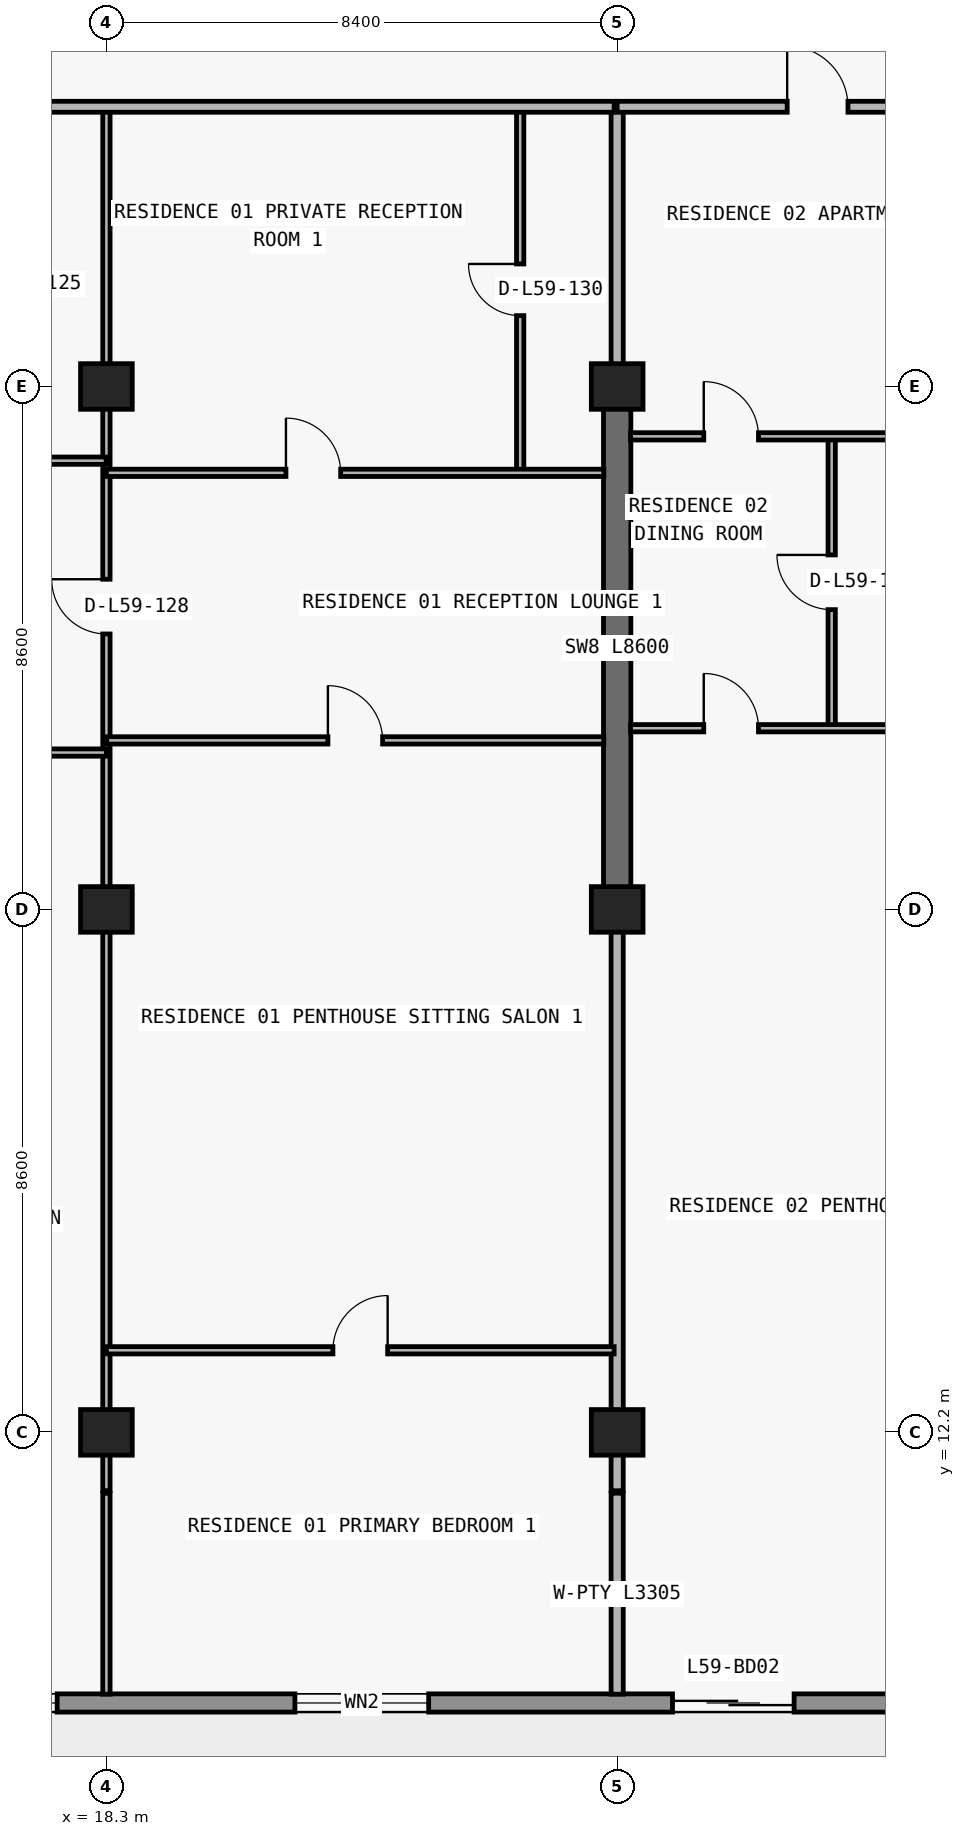
"""IFC4 building model, lengths in metres.
Left out: names, types, materials, properties, quantities, classifications, styles, units other than length and angle.
Written with IfcOpenShell. Run it as: python <this file> out.ifc"""

import sys

from ifc_helpers import new_model, si_unit, direction, frame, frame_2d, origin, origin_2d, place, context, subcontext, project, spatial, rectangle, extrude, element, fill, save


model = new_model("IFC4")
c1 = context("Model", 3, precision=1e-05, world=origin(), true_north=direction((0.0, 1.0)))
c2 = subcontext(c1, "Body", "Model", "MODEL_VIEW")
j1 = project(units=[si_unit("LENGTHUNIT", "METRE"), si_unit("PLANEANGLEUNIT", "RADIAN")], contexts=[c1])
p1 = place(None, origin())
s1 = spatial("IfcSite", under=j1, at=p1, CompositionType="ELEMENT")
p2 = place(p1, origin())
s2 = spatial("IfcBuilding", under=s1, at=p2, CompositionType="ELEMENT")
p3 = place(p2, frame((0.0, 0.0, 211.5)))
s3 = spatial("IfcBuildingStorey", under=s2, at=p3, CompositionType="ELEMENT", Elevation=211.5)
for number, where, z_axis, x_axis in (
    (1, (18.3, 12.2, 0.0), (0.0, 0.0, 1.0), (1.0, 0.0, 0.0)),
    (2, (26.7, 12.2, 0.0), (0.0, 0.0, 1.0), (1.0, 0.0, 0.0)),
    (3, (18.3, 20.8, 0.0), (0.0, 0.0, 1.0), (1.0, 0.0, 0.0)),
    (4, (26.7, 20.8, 0.0), (0.0, 0.0, 1.0), (1.0, 0.0, 0.0)),
    (5, (18.3, 29.4, 0.0), (0.0, 0.0, 1.0), (1.0, 0.0, 0.0)),
    (6, (26.7, 29.4, 0.0), (0.0, 0.0, 1.0), (1.0, 0.0, 0.0)),
):
    element("IfcColumn", number, at=place(p3, frame(where, z_axis=z_axis, x_axis=x_axis)), inside=s3, PredefinedType="COLUMN", context=c2, shape_type="SweptSolid", body=[
        extrude(rectangle(XDim=0.85, YDim=0.75, at=origin_2d()), origin(), (0.0, 0.0, 1.0), 3.05),
    ])
p4 = place(p3, frame((26.7, 20.8, 0.0), z_axis=(0.0, 0.0, 1.0), x_axis=(0.0, 1.0, 0.0)))
e7 = element("IfcWall", 7, at=p4, inside=s3, PredefinedType="SHEAR", context=c2, shape_type="SweptSolid", body=[
    extrude(rectangle(XDim=8.6, YDim=0.45, at=frame_2d((4.3, 0.0))), origin(), (0.0, 0.0, 1.0), 3.05),
])
p5 = place(p3, frame((67.7, 7.75, 0.0), z_axis=(0.0, 0.0, 1.0), x_axis=(-1.0, 0.0, 0.0)))
e8 = element("IfcWall", 8, at=p5, inside=s3, PredefinedType="STANDARD", context=c2, shape_type="SweptSolid", body=[
    extrude(rectangle(XDim=57.6, YDim=0.3, at=frame_2d((28.8, 0.0))), origin(), (0.0, 0.0, 1.0), 3.05),
])
p6 = place(p5, frame((54.69, 0.0, 0.0)))
e9 = element("IfcOpeningElement", 9, at=p6, cuts=e8, PredefinedType="OPENING", context=c2, shape_type="SweptSolid", body=[
    extrude(rectangle(XDim=2.0, YDim=2.3, at=frame_2d((1.0, 1.15))), frame((0.0, 0.16, 0.0), z_axis=(0.0, -1.0, 0.0), x_axis=(1.0, 0.0, 0.0)), (0.0, 0.0, 1.0), 0.32),
])
p7 = place(p5, frame((50.21, 0.0, 0.65)))
e10 = element("IfcOpeningElement", 10, at=p7, cuts=e8, PredefinedType="OPENING", context=c2, shape_type="SweptSolid", body=[
    extrude(rectangle(XDim=2.6, YDim=1.85, at=frame_2d((1.3, 0.925))), frame((0.0, 0.16, 0.0), z_axis=(0.0, -1.0, 0.0), x_axis=(1.0, 0.0, 0.0)), (0.0, 0.0, 1.0), 0.32),
])
p8 = place(p5, frame((44.1, 0.0, 0.85)))
e11 = element("IfcOpeningElement", 11, at=p8, cuts=e8, PredefinedType="OPENING", context=c2, shape_type="SweptSolid", body=[
    extrude(rectangle(XDim=2.2, YDim=1.55, at=frame_2d((1.1, 0.775))), frame((0.0, 0.16, 0.0), z_axis=(0.0, -1.0, 0.0), x_axis=(1.0, 0.0, 0.0)), (0.0, 0.0, 1.0), 0.32),
])
p9 = place(p5, frame((38.09, 0.0, 0.0)))
e12 = element("IfcOpeningElement", 12, at=p9, cuts=e8, PredefinedType="OPENING", context=c2, shape_type="SweptSolid", body=[
    extrude(rectangle(XDim=2.0, YDim=2.3, at=frame_2d((1.0, 1.15))), frame((0.0, 0.16, 0.0), z_axis=(0.0, -1.0, 0.0), x_axis=(1.0, 0.0, 0.0)), (0.0, 0.0, 1.0), 0.32),
])
p10 = place(p5, frame((33.41, 0.0, 0.65)))
e13 = element("IfcOpeningElement", 13, at=p10, cuts=e8, PredefinedType="OPENING", context=c2, shape_type="SweptSolid", body=[
    extrude(rectangle(XDim=2.6, YDim=1.85, at=frame_2d((1.3, 0.925))), frame((0.0, 0.16, 0.0), z_axis=(0.0, -1.0, 0.0), x_axis=(1.0, 0.0, 0.0)), (0.0, 0.0, 1.0), 0.32),
])
p11 = place(p5, frame((27.7, 0.0, 0.85)))
e14 = element("IfcOpeningElement", 14, at=p11, cuts=e8, PredefinedType="OPENING", context=c2, shape_type="SweptSolid", body=[
    extrude(rectangle(XDim=2.2, YDim=1.55, at=frame_2d((1.1, 0.775))), frame((0.0, 0.16, 0.0), z_axis=(0.0, -1.0, 0.0), x_axis=(1.0, 0.0, 0.0)), (0.0, 0.0, 1.0), 0.32),
])
p12 = place(p5, frame((19.7, 0.0, 0.85)))
e15 = element("IfcOpeningElement", 15, at=p12, cuts=e8, PredefinedType="OPENING", context=c2, shape_type="SweptSolid", body=[
    extrude(rectangle(XDim=2.2, YDim=1.55, at=frame_2d((1.1, 0.775))), frame((0.0, 0.16, 0.0), z_axis=(0.0, -1.0, 0.0), x_axis=(1.0, 0.0, 0.0)), (0.0, 0.0, 1.0), 0.32),
])
p13 = place(p5, frame((13.69, 0.0, 0.0)))
e16 = element("IfcOpeningElement", 16, at=p13, cuts=e8, PredefinedType="OPENING", context=c2, shape_type="SweptSolid", body=[
    extrude(rectangle(XDim=2.0, YDim=2.3, at=frame_2d((1.0, 1.15))), frame((0.0, 0.16, 0.0), z_axis=(0.0, -1.0, 0.0), x_axis=(1.0, 0.0, 0.0)), (0.0, 0.0, 1.0), 0.32),
])
p14 = place(p5, frame((9.01, 0.0, 0.65)))
e17 = element("IfcOpeningElement", 17, at=p14, cuts=e8, PredefinedType="OPENING", context=c2, shape_type="SweptSolid", body=[
    extrude(rectangle(XDim=2.6, YDim=1.85, at=frame_2d((1.3, 0.925))), frame((0.0, 0.16, 0.0), z_axis=(0.0, -1.0, 0.0), x_axis=(1.0, 0.0, 0.0)), (0.0, 0.0, 1.0), 0.32),
])
p15 = place(p5, frame((3.0, 0.0, 0.85)))
e18 = element("IfcOpeningElement", 18, at=p15, cuts=e8, PredefinedType="OPENING", context=c2, shape_type="SweptSolid", body=[
    extrude(rectangle(XDim=2.2, YDim=1.55, at=frame_2d((1.1, 0.775))), frame((0.0, 0.16, 0.0), z_axis=(0.0, -1.0, 0.0), x_axis=(1.0, 0.0, 0.0)), (0.0, 0.0, 1.0), 0.32),
])
p16 = place(p3, frame((18.3, 7.895, 0.0), z_axis=(0.0, 0.0, 1.0), x_axis=(0.0, 1.0, 0.0)))
e19 = element("IfcWall", 19, at=p16, inside=s3, PredefinedType="PARTITIONING", context=c2, shape_type="SweptSolid", body=[
    extrude(rectangle(XDim=3.305, YDim=0.12, at=frame_2d((1.652, 0.0))), origin(), (0.0, 0.0, 1.0), 3.05),
])
p17 = place(p3, frame((18.3, 11.24, 0.0), z_axis=(0.0, 0.0, 1.0), x_axis=(0.0, 1.0, 0.0)))
e20 = element("IfcWall", 20, at=p17, inside=s3, PredefinedType="PARTITIONING", context=c2, shape_type="SweptSolid", body=[
    extrude(rectangle(XDim=22.76, YDim=0.12, at=frame_2d((11.38, 0.0))), origin(), (0.0, 0.0, 1.0), 2.263),
])
p18 = place(p17, frame((14.09, 0.0, 0.0)))
e21 = element("IfcOpeningElement", 21, at=p18, cuts=e20, PredefinedType="OPENING", context=c2, shape_type="SweptSolid", body=[
    extrude(rectangle(XDim=0.9, YDim=2.15, at=frame_2d((0.45, 1.075))), frame((0.0, 0.07, 0.0), z_axis=(0.0, -1.0, 0.0), x_axis=(1.0, 0.0, 0.0)), (0.0, 0.0, 1.0), 0.14),
])
p19 = place(p3, frame((25.105, 27.98, 0.0), z_axis=(0.0, 0.0, 1.0), x_axis=(0.0, 1.0, 0.0)))
e22 = element("IfcWall", 22, at=p19, inside=s3, PredefinedType="PARTITIONING", context=c2, shape_type="SweptSolid", body=[
    extrude(rectangle(XDim=6.02, YDim=0.12, at=frame_2d((3.01, 0.0))), origin(), (0.0, 0.0, 1.0), 3.05),
])
p20 = place(p19, frame((2.585, 0.0, 0.0)))
e23 = element("IfcOpeningElement", 23, at=p20, cuts=e22, PredefinedType="OPENING", context=c2, shape_type="SweptSolid", body=[
    extrude(rectangle(XDim=0.85, YDim=2.1, at=frame_2d((0.425, 1.05))), frame((0.0, 0.07, 0.0), z_axis=(0.0, -1.0, 0.0), x_axis=(1.0, 0.0, 0.0)), (0.0, 0.0, 1.0), 0.14),
])
p21 = place(p3, frame((26.7, 7.895, 0.0), z_axis=(0.0, 0.0, 1.0), x_axis=(0.0, 1.0, 0.0)))
e24 = element("IfcWall", 24, at=p21, inside=s3, PredefinedType="PARTITIONING", context=c2, shape_type="SweptSolid", body=[
    extrude(rectangle(XDim=3.305, YDim=0.2, at=frame_2d((1.652, 0.0))), origin(), (0.0, 0.0, 1.0), 3.05),
])
p22 = place(p3, frame((26.7, 11.24, 0.0), z_axis=(0.0, 0.0, 1.0), x_axis=(0.0, 1.0, 0.0)))
e25 = element("IfcWall", 25, at=p22, inside=s3, PredefinedType="PARTITIONING", context=c2, shape_type="SweptSolid", body=[
    extrude(rectangle(XDim=9.555, YDim=0.2, at=frame_2d((4.777, 0.0))), origin(), (0.0, 0.0, 1.0), 2.263),
])
p23 = place(p3, frame((26.7, 29.405, 0.0), z_axis=(0.0, 0.0, 1.0), x_axis=(0.0, 1.0, 0.0)))
e26 = element("IfcWall", 26, at=p23, inside=s3, PredefinedType="PARTITIONING", context=c2, shape_type="SweptSolid", body=[
    extrude(rectangle(XDim=4.595, YDim=0.2, at=frame_2d((2.297, 0.0))), origin(), (0.0, 0.0, 1.0), 2.335),
])
p24 = place(p3, frame((30.228, 23.78, 0.0), z_axis=(0.0, 0.0, 1.0), x_axis=(0.0, 1.0, 0.0)))
e27 = element("IfcWall", 27, at=p24, inside=s3, PredefinedType="PARTITIONING", context=c2, shape_type="SweptSolid", body=[
    extrude(rectangle(XDim=4.8, YDim=0.12, at=frame_2d((2.4, 0.0))), origin(), (0.0, 0.0, 1.0), 3.05),
])
p25 = place(p24, frame((1.95, 0.0, 0.0)))
e28 = element("IfcOpeningElement", 28, at=p25, cuts=e27, PredefinedType="OPENING", context=c2, shape_type="SweptSolid", body=[
    extrude(rectangle(XDim=0.9, YDim=2.15, at=frame_2d((0.45, 1.075))), frame((0.0, 0.07, 0.0), z_axis=(0.0, -1.0, 0.0), x_axis=(1.0, 0.0, 0.0)), (0.0, 0.0, 1.0), 0.14),
])
p26 = place(p3, frame((18.3, 13.55, 0.0), z_axis=(0.0, 0.0, 1.0), x_axis=(1.0, 0.0, 0.0)))
e29 = element("IfcWall", 29, at=p26, inside=s3, PredefinedType="PARTITIONING", context=c2, shape_type="SweptSolid", body=[
    extrude(rectangle(XDim=8.35, YDim=0.12, at=frame_2d((4.175, 0.0))), origin(), (0.0, 0.0, 1.0), 3.05),
])
p27 = place(p26, frame((3.725, 0.0, 0.0)))
e30 = element("IfcOpeningElement", 30, at=p27, cuts=e29, PredefinedType="OPENING", context=c2, shape_type="SweptSolid", body=[
    extrude(rectangle(XDim=0.9, YDim=2.15, at=frame_2d((0.45, 1.075))), frame((0.0, 0.07, 0.0), z_axis=(0.0, -1.0, 0.0), x_axis=(1.0, 0.0, 0.0)), (0.0, 0.0, 1.0), 0.14),
])
p28 = place(p3, frame((10.1, 23.38, 0.0), z_axis=(0.0, 0.0, 1.0), x_axis=(1.0, 0.0, 0.0)))
e31 = element("IfcWall", 31, at=p28, inside=s3, PredefinedType="PARTITIONING", context=c2, shape_type="SweptSolid", body=[
    extrude(rectangle(XDim=8.2, YDim=0.12, at=frame_2d((4.1, 0.0))), origin(), (0.0, 0.0, 1.0), 3.05),
])
p29 = place(p28, frame((3.65, 0.0, 0.0)))
e32 = element("IfcOpeningElement", 32, at=p29, cuts=e31, PredefinedType="OPENING", context=c2, shape_type="SweptSolid", body=[
    extrude(rectangle(XDim=0.9, YDim=2.15, at=frame_2d((0.45, 1.075))), frame((0.0, 0.07, 0.0), z_axis=(0.0, -1.0, 0.0), x_axis=(1.0, 0.0, 0.0)), (0.0, 0.0, 1.0), 0.14),
])
p30 = place(p3, frame((18.305, 23.58, 0.0), z_axis=(0.0, 0.0, 1.0), x_axis=(1.0, 0.0, 0.0)))
e33 = element("IfcWall", 33, at=p30, inside=s3, PredefinedType="PARTITIONING", context=c2, shape_type="SweptSolid", body=[
    extrude(rectangle(XDim=8.175, YDim=0.12, at=frame_2d((4.087, 0.0))), origin(), (0.0, 0.0, 1.0), 3.05),
])
p31 = place(p30, frame((3.637, 0.0, 0.0)))
e34 = element("IfcOpeningElement", 34, at=p31, cuts=e33, PredefinedType="OPENING", context=c2, shape_type="SweptSolid", body=[
    extrude(rectangle(XDim=0.9, YDim=2.15, at=frame_2d((0.45, 1.075))), frame((0.0, 0.07, 0.0), z_axis=(0.0, -1.0, 0.0), x_axis=(1.0, 0.0, 0.0)), (0.0, 0.0, 1.0), 0.14),
])
p32 = place(p3, frame((26.92, 23.78, 0.0), z_axis=(0.0, 0.0, 1.0), x_axis=(1.0, 0.0, 0.0)))
e35 = element("IfcWall", 35, at=p32, inside=s3, PredefinedType="PARTITIONING", context=c2, shape_type="SweptSolid", body=[
    extrude(rectangle(XDim=8.18, YDim=0.12, at=frame_2d((4.09, 0.0))), origin(), (0.0, 0.0, 1.0), 3.05),
])
p33 = place(p32, frame((1.204, 0.0, 0.0)))
e36 = element("IfcOpeningElement", 36, at=p33, cuts=e35, PredefinedType="OPENING", context=c2, shape_type="SweptSolid", body=[
    extrude(rectangle(XDim=0.9, YDim=2.15, at=frame_2d((0.45, 1.075))), frame((0.0, 0.07, 0.0), z_axis=(0.0, -1.0, 0.0), x_axis=(1.0, 0.0, 0.0)), (0.0, 0.0, 1.0), 0.14),
])
p34 = place(p3, frame((18.3, 27.98, 0.0), z_axis=(0.0, 0.0, 1.0), x_axis=(1.0, 0.0, 0.0)))
e37 = element("IfcWall", 37, at=p34, inside=s3, PredefinedType="PARTITIONING", context=c2, shape_type="SweptSolid", body=[
    extrude(rectangle(XDim=8.18, YDim=0.12, at=frame_2d((4.09, 0.0))), origin(), (0.0, 0.0, 1.0), 3.05),
])
p35 = place(p34, frame((2.952, 0.0, 0.0)))
e38 = element("IfcOpeningElement", 38, at=p35, cuts=e37, PredefinedType="OPENING", context=c2, shape_type="SweptSolid", body=[
    extrude(rectangle(XDim=0.9, YDim=2.15, at=frame_2d((0.45, 1.075))), frame((0.0, 0.07, 0.0), z_axis=(0.0, -1.0, 0.0), x_axis=(1.0, 0.0, 0.0)), (0.0, 0.0, 1.0), 0.14),
])
p36 = place(p3, frame((10.1, 28.18, 0.0), z_axis=(0.0, 0.0, 1.0), x_axis=(1.0, 0.0, 0.0)))
e39 = element("IfcWall", 39, at=p36, inside=s3, PredefinedType="PARTITIONING", context=c2, shape_type="SweptSolid", body=[
    extrude(rectangle(XDim=8.195, YDim=0.12, at=frame_2d((4.097, 0.0))), origin(), (0.0, 0.0, 1.0), 3.05),
])
p37 = place(p36, frame((2.765, 0.0, 0.0)))
e40 = element("IfcOpeningElement", 40, at=p37, cuts=e39, PredefinedType="OPENING", context=c2, shape_type="SweptSolid", body=[
    extrude(rectangle(XDim=0.9, YDim=2.15, at=frame_2d((0.45, 1.075))), frame((0.0, 0.07, 0.0), z_axis=(0.0, -1.0, 0.0), x_axis=(1.0, 0.0, 0.0)), (0.0, 0.0, 1.0), 0.14),
])
p38 = place(p3, frame((26.92, 28.58, 0.0), z_axis=(0.0, 0.0, 1.0), x_axis=(1.0, 0.0, 0.0)))
e41 = element("IfcWall", 41, at=p38, inside=s3, PredefinedType="PARTITIONING", context=c2, shape_type="SweptSolid", body=[
    extrude(rectangle(XDim=8.175, YDim=0.12, at=frame_2d((4.087, 0.0))), origin(), (0.0, 0.0, 1.0), 3.05),
])
p39 = place(p38, frame((1.204, 0.0, 0.0)))
e42 = element("IfcOpeningElement", 42, at=p39, cuts=e41, PredefinedType="OPENING", context=c2, shape_type="SweptSolid", body=[
    extrude(rectangle(XDim=0.9, YDim=2.15, at=frame_2d((0.45, 1.075))), frame((0.0, 0.07, 0.0), z_axis=(0.0, -1.0, 0.0), x_axis=(1.0, 0.0, 0.0)), (0.0, 0.0, 1.0), 0.14),
])
p40 = place(p3, frame((10.105, 34.0, 0.0), z_axis=(0.0, 0.0, 1.0), x_axis=(1.0, 0.0, 0.0)))
e43 = element("IfcWall", 43, at=p40, inside=s3, PredefinedType="PARTITIONING", context=c2, shape_type="SweptSolid", body=[
    extrude(rectangle(XDim=16.545, YDim=0.18, at=frame_2d((8.272, 0.0))), origin(), (0.0, 0.0, 1.0), 3.05),
])
p41 = place(p40, frame((2.712, 0.0, 0.0)))
e44 = element("IfcOpeningElement", 44, at=p41, cuts=e43, PredefinedType="OPENING", context=c2, shape_type="SweptSolid", body=[
    extrude(rectangle(XDim=1.0, YDim=2.2, at=frame_2d((0.5, 1.1))), frame((0.0, 0.1, 0.0), z_axis=(0.0, -1.0, 0.0), x_axis=(1.0, 0.0, 0.0)), (0.0, 0.0, 1.0), 0.2),
])
p42 = place(p3, frame((26.7, 34.0, 0.0), z_axis=(0.0, 0.0, 1.0), x_axis=(1.0, 0.0, 0.0)))
e45 = element("IfcWall", 45, at=p42, inside=s3, PredefinedType="PARTITIONING", context=c2, shape_type="SweptSolid", body=[
    extrude(rectangle(XDim=41.0, YDim=0.18, at=frame_2d((20.5, 0.0))), origin(), (0.0, 0.0, 1.0), 3.05),
])
p43 = place(p42, frame((2.796, 0.0, 0.0)))
e46 = element("IfcOpeningElement", 46, at=p43, cuts=e45, PredefinedType="OPENING", context=c2, shape_type="SweptSolid", body=[
    extrude(rectangle(XDim=1.0, YDim=2.2, at=frame_2d((0.5, 1.1))), frame((0.0, 0.1, 0.0), z_axis=(0.0, -1.0, 0.0), x_axis=(1.0, 0.0, 0.0)), (0.0, 0.0, 1.0), 0.2),
])
p44 = place(p42, frame((27.199, 0.0, 0.0)))
e47 = element("IfcOpeningElement", 47, at=p44, cuts=e45, PredefinedType="OPENING", context=c2, shape_type="SweptSolid", body=[
    extrude(rectangle(XDim=1.0, YDim=2.2, at=frame_2d((0.5, 1.1))), frame((0.0, 0.1, 0.0), z_axis=(0.0, -1.0, 0.0), x_axis=(1.0, 0.0, 0.0)), (0.0, 0.0, 1.0), 0.2),
])
p45 = place(p7, origin())
e48 = element("IfcWindow", 48, at=p45, inside=s3, PartitioningType="SINGLE_PANEL", PredefinedType="WINDOW", context=c2, shape_type="SweptSolid", body=[
    extrude(rectangle(XDim=2.6, YDim=1.85, at=frame_2d((1.3, 0.925))), frame((0.0, 0.03, 0.0), z_axis=(0.0, -1.0, 0.0), x_axis=(1.0, 0.0, 0.0)), (0.0, 0.0, 1.0), 0.06),
])
fill(e10, e48)
p46 = place(p8, origin())
e49 = element("IfcWindow", 49, at=p46, inside=s3, PartitioningType="SINGLE_PANEL", PredefinedType="WINDOW", context=c2, shape_type="SweptSolid", body=[
    extrude(rectangle(XDim=2.2, YDim=1.55, at=frame_2d((1.1, 0.775))), frame((0.0, 0.03, 0.0), z_axis=(0.0, -1.0, 0.0), x_axis=(1.0, 0.0, 0.0)), (0.0, 0.0, 1.0), 0.06),
])
fill(e11, e49)
p47 = place(p9, origin())
e50 = element("IfcDoor", 50, at=p47, inside=s3, OperationType="DOUBLE_DOOR_SLIDING", PredefinedType="DOOR", context=c2, shape_type="SweptSolid", body=[
    extrude(rectangle(XDim=2.0, YDim=2.3, at=frame_2d((1.0, 1.15))), frame((0.0, 0.025, 0.0), z_axis=(0.0, -1.0, 0.0), x_axis=(1.0, 0.0, 0.0)), (0.0, 0.0, 1.0), 0.05),
])
fill(e12, e50)
p48 = place(p18, origin())
e51 = element("IfcDoor", 51, at=p48, inside=s3, OperationType="SINGLE_SWING_RIGHT", PredefinedType="DOOR", context=c2, shape_type="SweptSolid", body=[
    extrude(rectangle(XDim=0.9, YDim=2.15, at=frame_2d((0.45, 1.075))), frame((0.0, 0.025, 0.0), z_axis=(0.0, -1.0, 0.0), x_axis=(1.0, 0.0, 0.0)), (0.0, 0.0, 1.0), 0.05),
])
fill(e21, e51)
p49 = place(p35, origin())
e52 = element("IfcDoor", 52, at=p49, inside=s3, OperationType="SINGLE_SWING_LEFT", PredefinedType="DOOR", context=c2, shape_type="SweptSolid", body=[
    extrude(rectangle(XDim=0.9, YDim=2.15, at=frame_2d((0.45, 1.075))), frame((0.0, 0.025, 0.0), z_axis=(0.0, -1.0, 0.0), x_axis=(1.0, 0.0, 0.0)), (0.0, 0.0, 1.0), 0.05),
])
fill(e38, e52)
p50 = place(p20, origin())
e53 = element("IfcDoor", 53, at=p50, inside=s3, OperationType="SINGLE_SWING_RIGHT", PredefinedType="DOOR", context=c2, shape_type="SweptSolid", body=[
    extrude(rectangle(XDim=0.85, YDim=2.1, at=frame_2d((0.425, 1.05))), frame((0.0, 0.025, 0.0), z_axis=(0.0, -1.0, 0.0), x_axis=(1.0, 0.0, 0.0)), (0.0, 0.0, 1.0), 0.05),
])
fill(e23, e53)
p51 = place(p31, origin())
e54 = element("IfcDoor", 54, at=p51, inside=s3, OperationType="SINGLE_SWING_LEFT", PredefinedType="DOOR", context=c2, shape_type="SweptSolid", body=[
    extrude(rectangle(XDim=0.9, YDim=2.15, at=frame_2d((0.45, 1.075))), frame((0.0, 0.025, 0.0), z_axis=(0.0, -1.0, 0.0), x_axis=(1.0, 0.0, 0.0)), (0.0, 0.0, 1.0), 0.05),
])
fill(e34, e54)
p52 = place(p27, origin())
e55 = element("IfcDoor", 55, at=p52, inside=s3, OperationType="SINGLE_SWING_RIGHT", PredefinedType="DOOR", context=c2, shape_type="SweptSolid", body=[
    extrude(rectangle(XDim=0.9, YDim=2.15, at=frame_2d((0.45, 1.075))), frame((0.0, 0.025, 0.0), z_axis=(0.0, -1.0, 0.0), x_axis=(1.0, 0.0, 0.0)), (0.0, 0.0, 1.0), 0.05),
])
fill(e30, e55)
p53 = place(p43, origin())
e56 = element("IfcDoor", 56, at=p53, inside=s3, OperationType="SINGLE_SWING_LEFT", PredefinedType="DOOR", context=c2, shape_type="SweptSolid", body=[
    extrude(rectangle(XDim=1.0, YDim=2.2, at=frame_2d((0.5, 1.1))), frame((0.0, 0.025, 0.0), z_axis=(0.0, -1.0, 0.0), x_axis=(1.0, 0.0, 0.0)), (0.0, 0.0, 1.0), 0.05),
])
fill(e46, e56)
p54 = place(p39, origin())
e57 = element("IfcDoor", 57, at=p54, inside=s3, OperationType="SINGLE_SWING_LEFT", PredefinedType="DOOR", context=c2, shape_type="SweptSolid", body=[
    extrude(rectangle(XDim=0.9, YDim=2.15, at=frame_2d((0.45, 1.075))), frame((0.0, 0.025, 0.0), z_axis=(0.0, -1.0, 0.0), x_axis=(1.0, 0.0, 0.0)), (0.0, 0.0, 1.0), 0.05),
])
fill(e42, e57)
p55 = place(p25, origin())
e58 = element("IfcDoor", 58, at=p55, inside=s3, OperationType="SINGLE_SWING_RIGHT", PredefinedType="DOOR", context=c2, shape_type="SweptSolid", body=[
    extrude(rectangle(XDim=0.9, YDim=2.15, at=frame_2d((0.45, 1.075))), frame((0.0, 0.025, 0.0), z_axis=(0.0, -1.0, 0.0), x_axis=(1.0, 0.0, 0.0)), (0.0, 0.0, 1.0), 0.05),
])
fill(e28, e58)
p56 = place(p33, origin())
e59 = element("IfcDoor", 59, at=p56, inside=s3, OperationType="SINGLE_SWING_LEFT", PredefinedType="DOOR", context=c2, shape_type="SweptSolid", body=[
    extrude(rectangle(XDim=0.9, YDim=2.15, at=frame_2d((0.45, 1.075))), frame((0.0, 0.025, 0.0), z_axis=(0.0, -1.0, 0.0), x_axis=(1.0, 0.0, 0.0)), (0.0, 0.0, 1.0), 0.05),
])
fill(e36, e59)
save(model, sys.argv[1])
